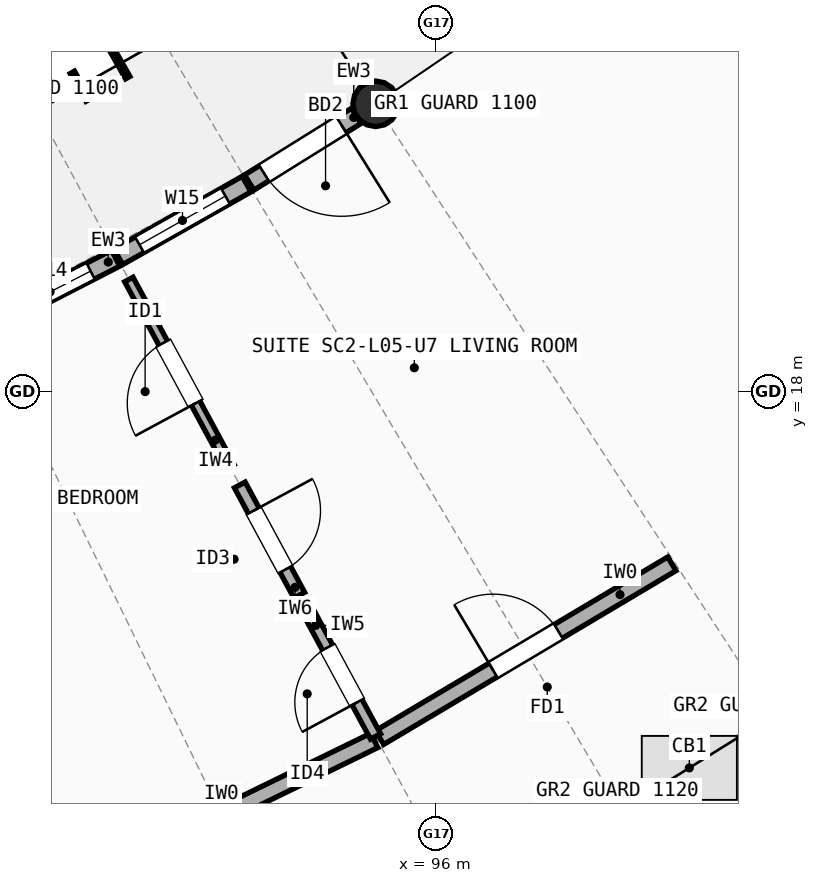
"""IFC4 building model, lengths in metres.
Left out: names, types, materials, properties, quantities, classifications, styles, units other than length and angle.
Written with IfcOpenShell. Run it as: python <this file> out.ifc"""

import sys

from ifc_helpers import new_model, si_unit, direction, frame, frame_2d, origin, origin_2d, place, context, subcontext, project, spatial, rectangle, circle, extrude, element, fill, save


model = new_model("IFC4")
c1 = context("Model", 3, precision=1e-05, world=origin(), true_north=direction((0.0, 1.0)))
c2 = subcontext(c1, "Body", "Model", "MODEL_VIEW")
j1 = project(units=[si_unit("LENGTHUNIT", "METRE"), si_unit("PLANEANGLEUNIT", "RADIAN")], contexts=[c1])
p1 = place(None, origin())
s1 = spatial("IfcSite", under=j1, at=p1, CompositionType="ELEMENT")
p2 = place(p1, origin())
s2 = spatial("IfcBuilding", under=s1, at=p2, CompositionType="ELEMENT")
p3 = place(p2, frame((0.0, 0.0, 17.3)))
s3 = spatial("IfcBuildingStorey", under=s2, at=p3, CompositionType="ELEMENT", Elevation=17.3)
p4 = place(p3, frame((95.207, 21.785, 0.0), z_axis=(0.0, 0.0, 1.0), x_axis=(1.0, 0.0, 0.0)))
e1 = element("IfcColumn", 1, at=p4, inside=s3, PredefinedType="COLUMN", context=c2, shape_type="SweptSolid", body=[
    extrude(circle(Radius=0.3, at=origin_2d()), origin(), (0.0, 0.0, 1.0), 2.94),
])
p5 = place(p3, frame((90.06, 18.867, 0.0), z_axis=(0.0, 0.0, 1.0), x_axis=(0.889517261343, 0.456901566832, 0.0)))
e2 = element("IfcWall", 2, at=p5, inside=s3, PredefinedType="STANDARD", context=c2, shape_type="SweptSolid", body=[
    extrude(rectangle(XDim=1.94, YDim=0.235, at=frame_2d((0.97, 0.0))), origin(), (0.0, 0.0, 1.0), 2.676),
])
p6 = place(p5, frame((0.37, 0.0, 0.85)))
e3 = element("IfcOpeningElement", 3, at=p6, cuts=e2, PredefinedType="OPENING", context=c2, shape_type="SweptSolid", body=[
    extrude(rectangle(XDim=1.2, YDim=1.5, at=frame_2d((0.6, 0.75))), frame((0.0, 0.127, 0.0), z_axis=(0.0, -1.0, 0.0), x_axis=(1.0, 0.0, 0.0)), (0.0, 0.0, 1.0), 0.255),
])
p7 = place(p3, frame((91.821, 19.772, 0.0), z_axis=(0.0, 0.0, 1.0), x_axis=(0.86993400964, 0.493168144623, 0.0)))
e4 = element("IfcWall", 4, at=p7, inside=s3, PredefinedType="STANDARD", context=c2, shape_type="SweptSolid", body=[
    extrude(rectangle(XDim=1.94, YDim=0.235, at=frame_2d((0.97, 0.0))), origin(), (0.0, 0.0, 1.0), 2.676),
])
p8 = place(p7, frame((0.32, 0.0, 0.85)))
e5 = element("IfcOpeningElement", 5, at=p8, cuts=e4, PredefinedType="OPENING", context=c2, shape_type="SweptSolid", body=[
    extrude(rectangle(XDim=1.3, YDim=1.45, at=frame_2d((0.65, 0.725))), frame((0.0, 0.127, 0.0), z_axis=(0.0, -1.0, 0.0), x_axis=(1.0, 0.0, 0.0)), (0.0, 0.0, 1.0), 0.255),
])
p9 = place(p3, frame((93.543, 20.75, 0.0), z_axis=(0.0, 0.0, 1.0), x_axis=(0.848955427013, 0.528464457598, 0.0)))
e6 = element("IfcWall", 6, at=p9, inside=s3, PredefinedType="STANDARD", context=c2, shape_type="SweptSolid", body=[
    extrude(rectangle(XDim=1.66, YDim=0.235, at=frame_2d((0.83, 0.0))), origin(), (0.0, 0.0, 1.0), 2.676),
])
p10 = place(p9, frame((0.23, 0.0, 0.0)))
e7 = element("IfcOpeningElement", 7, at=p10, cuts=e6, PredefinedType="OPENING", context=c2, shape_type="SweptSolid", body=[
    extrude(rectangle(XDim=1.2, YDim=2.15, at=frame_2d((0.6, 1.075))), frame((0.0, 0.127, 0.0), z_axis=(0.0, -1.0, 0.0), x_axis=(1.0, 0.0, 0.0)), (0.0, 0.0, 1.0), 0.255),
])
p11 = place(p3, frame((88.415, 17.638, 0.0), z_axis=(0.0, 0.0, 1.0), x_axis=(0.400932910895, -0.916107417807, 0.0)))
e8 = element("IfcWall", 8, at=p11, inside=s3, PredefinedType="SOLIDWALL", context=c2, shape_type="SweptSolid", body=[
    extrude(rectangle(XDim=6.736, YDim=0.23, at=frame_2d((3.368, 0.0))), origin(), (0.0, 0.0, 1.0), 2.734),
])
p12 = place(p3, frame((91.167, 11.448, 0.0), z_axis=(0.0, 0.0, 1.0), x_axis=(0.898794149603, 0.438370934985, 0.0)))
e9 = element("IfcWall", 9, at=p12, inside=s3, PredefinedType="SOLIDWALL", context=c2, shape_type="SweptSolid", body=[
    extrude(rectangle(XDim=4.473, YDim=0.21, at=frame_2d((2.236, 0.0))), origin(), (0.0, 0.0, 1.0), 2.754),
])
p13 = place(p3, frame((95.258, 13.447, 0.0), z_axis=(0.0, 0.0, 1.0), x_axis=(0.859614290038, 0.510943511909, 0.0)))
e10 = element("IfcWall", 10, at=p13, inside=s3, PredefinedType="SOLIDWALL", context=c2, shape_type="SweptSolid", body=[
    extrude(rectangle(XDim=4.473, YDim=0.21, at=frame_2d((2.236, 0.0))), origin(), (0.0, 0.0, 1.0), 2.734),
])
p14 = place(p13, frame((1.737, 0.0, 0.0)))
e11 = element("IfcOpeningElement", 11, at=p14, cuts=e10, PredefinedType="OPENING", context=c2, shape_type="SweptSolid", body=[
    extrude(rectangle(XDim=1.0, YDim=2.15, at=frame_2d((0.5, 1.075))), frame((0.0, 0.115, 0.0), z_axis=(0.0, -1.0, 0.0), x_axis=(1.0, 0.0, 0.0)), (0.0, 0.0, 1.0), 0.23),
])
p15 = place(p3, frame((91.959, 19.474, 0.0), z_axis=(0.0, 0.0, 1.0), x_axis=(0.475103009949, -0.879930184695, 0.0)))
e12 = element("IfcWall", 12, at=p15, inside=s3, PredefinedType="PARTITIONING", context=c2, shape_type="SweptSolid", body=[
    extrude(rectangle(XDim=2.8, YDim=0.125, at=frame_2d((1.4, 0.0))), origin(), (0.0, 0.0, 1.0), 2.714),
])
p16 = place(p15, frame((0.95, 0.0, 0.0)))
e13 = element("IfcOpeningElement", 13, at=p16, cuts=e12, PredefinedType="OPENING", context=c2, shape_type="SweptSolid", body=[
    extrude(rectangle(XDim=0.9, YDim=2.1, at=frame_2d((0.45, 1.05))), frame((0.0, 0.073, 0.0), z_axis=(0.0, -1.0, 0.0), x_axis=(1.0, 0.0, 0.0)), (0.0, 0.0, 1.0), 0.145),
])
p17 = place(p3, frame((93.418, 16.771, 0.0), z_axis=(0.0, 0.0, 1.0), x_axis=(0.475080097018, -0.879942555749, 0.0)))
e14 = element("IfcWall", 14, at=p17, inside=s3, PredefinedType="PLUMBINGWALL", context=c2, shape_type="SweptSolid", body=[
    extrude(rectangle(XDim=1.648, YDim=0.16, at=frame_2d((0.824, 0.0))), origin(), (0.0, 0.0, 1.0), 2.714),
])
p18 = place(p17, frame((0.384, 0.0, 0.0)))
e15 = element("IfcOpeningElement", 15, at=p18, cuts=e14, PredefinedType="OPENING", context=c2, shape_type="SweptSolid", body=[
    extrude(rectangle(XDim=0.88, YDim=2.1, at=frame_2d((0.44, 1.05))), frame((0.0, 0.09, 0.0), z_axis=(0.0, -1.0, 0.0), x_axis=(1.0, 0.0, 0.0)), (0.0, 0.0, 1.0), 0.18),
])
p19 = place(p3, frame((94.331, 15.081, 0.0), z_axis=(0.0, 0.0, 1.0), x_axis=(0.475017414672, -0.879976395001, 0.0)))
e16 = element("IfcWall", 16, at=p19, inside=s3, PredefinedType="PARTITIONING", context=c2, shape_type="SweptSolid", body=[
    extrude(rectangle(XDim=1.84, YDim=0.15, at=frame_2d((0.92, 0.0))), origin(), (0.0, 0.0, 1.0), 2.714),
])
p20 = place(p19, frame((0.51, 0.0, 0.0)))
e17 = element("IfcOpeningElement", 17, at=p20, cuts=e16, PredefinedType="OPENING", context=c2, shape_type="SweptSolid", body=[
    extrude(rectangle(XDim=0.82, YDim=2.08, at=frame_2d((0.41, 1.04))), frame((0.0, 0.085, 0.0), z_axis=(0.0, -1.0, 0.0), x_axis=(1.0, 0.0, 0.0)), (0.0, 0.0, 1.0), 0.17),
])
p21 = place(p6, origin())
e18 = element("IfcWindow", 18, at=p21, inside=s3, PartitioningType="SINGLE_PANEL", PredefinedType="WINDOW", context=c2, shape_type="SweptSolid", body=[
    extrude(rectangle(XDim=1.2, YDim=1.5, at=frame_2d((0.6, 0.75))), frame((0.0, 0.03, 0.0), z_axis=(0.0, -1.0, 0.0), x_axis=(1.0, 0.0, 0.0)), (0.0, 0.0, 1.0), 0.06),
])
fill(e3, e18)
p22 = place(p8, origin())
e19 = element("IfcWindow", 19, at=p22, inside=s3, PartitioningType="SINGLE_PANEL", PredefinedType="WINDOW", context=c2, shape_type="SweptSolid", body=[
    extrude(rectangle(XDim=1.3, YDim=1.45, at=frame_2d((0.65, 0.725))), frame((0.0, 0.03, 0.0), z_axis=(0.0, -1.0, 0.0), x_axis=(1.0, 0.0, 0.0)), (0.0, 0.0, 1.0), 0.06),
])
fill(e5, e19)
p23 = place(p10, origin())
e20 = element("IfcDoor", 20, at=p23, inside=s3, OperationType="SINGLE_SWING_RIGHT", PredefinedType="DOOR", context=c2, shape_type="SweptSolid", body=[
    extrude(rectangle(XDim=1.2, YDim=2.15, at=frame_2d((0.6, 1.075))), frame((0.0, 0.025, 0.0), z_axis=(0.0, -1.0, 0.0), x_axis=(1.0, 0.0, 0.0)), (0.0, 0.0, 1.0), 0.05),
])
fill(e7, e20)
p24 = place(p14, origin())
e21 = element("IfcDoor", 21, at=p24, inside=s3, OperationType="SINGLE_SWING_LEFT", PredefinedType="DOOR", context=c2, shape_type="SweptSolid", body=[
    extrude(rectangle(XDim=1.0, YDim=2.15, at=frame_2d((0.5, 1.075))), frame((0.0, 0.025, 0.0), z_axis=(0.0, -1.0, 0.0), x_axis=(1.0, 0.0, 0.0)), (0.0, 0.0, 1.0), 0.05),
])
fill(e11, e21)
p25 = place(p16, origin())
e22 = element("IfcDoor", 22, at=p25, inside=s3, OperationType="SINGLE_SWING_RIGHT", PredefinedType="DOOR", context=c2, shape_type="SweptSolid", body=[
    extrude(rectangle(XDim=0.9, YDim=2.1, at=frame_2d((0.45, 1.05))), frame((0.0, 0.025, 0.0), z_axis=(0.0, -1.0, 0.0), x_axis=(1.0, 0.0, 0.0)), (0.0, 0.0, 1.0), 0.05),
])
fill(e13, e22)
p26 = place(p18, origin())
e23 = element("IfcDoor", 23, at=p26, inside=s3, OperationType="SINGLE_SWING_LEFT", PredefinedType="DOOR", context=c2, shape_type="SweptSolid", body=[
    extrude(rectangle(XDim=0.88, YDim=2.1, at=frame_2d((0.44, 1.05))), frame((0.0, 0.025, 0.0), z_axis=(0.0, -1.0, 0.0), x_axis=(1.0, 0.0, 0.0)), (0.0, 0.0, 1.0), 0.05),
])
fill(e15, e23)
p27 = place(p20, origin())
e24 = element("IfcDoor", 24, at=p27, inside=s3, OperationType="SINGLE_SWING_RIGHT", PredefinedType="DOOR", context=c2, shape_type="SweptSolid", body=[
    extrude(rectangle(XDim=0.82, YDim=2.08, at=frame_2d((0.41, 1.04))), frame((0.0, 0.025, 0.0), z_axis=(0.0, -1.0, 0.0), x_axis=(1.0, 0.0, 0.0)), (0.0, 0.0, 1.0), 0.05),
])
fill(e17, e24)
save(model, sys.argv[1])
